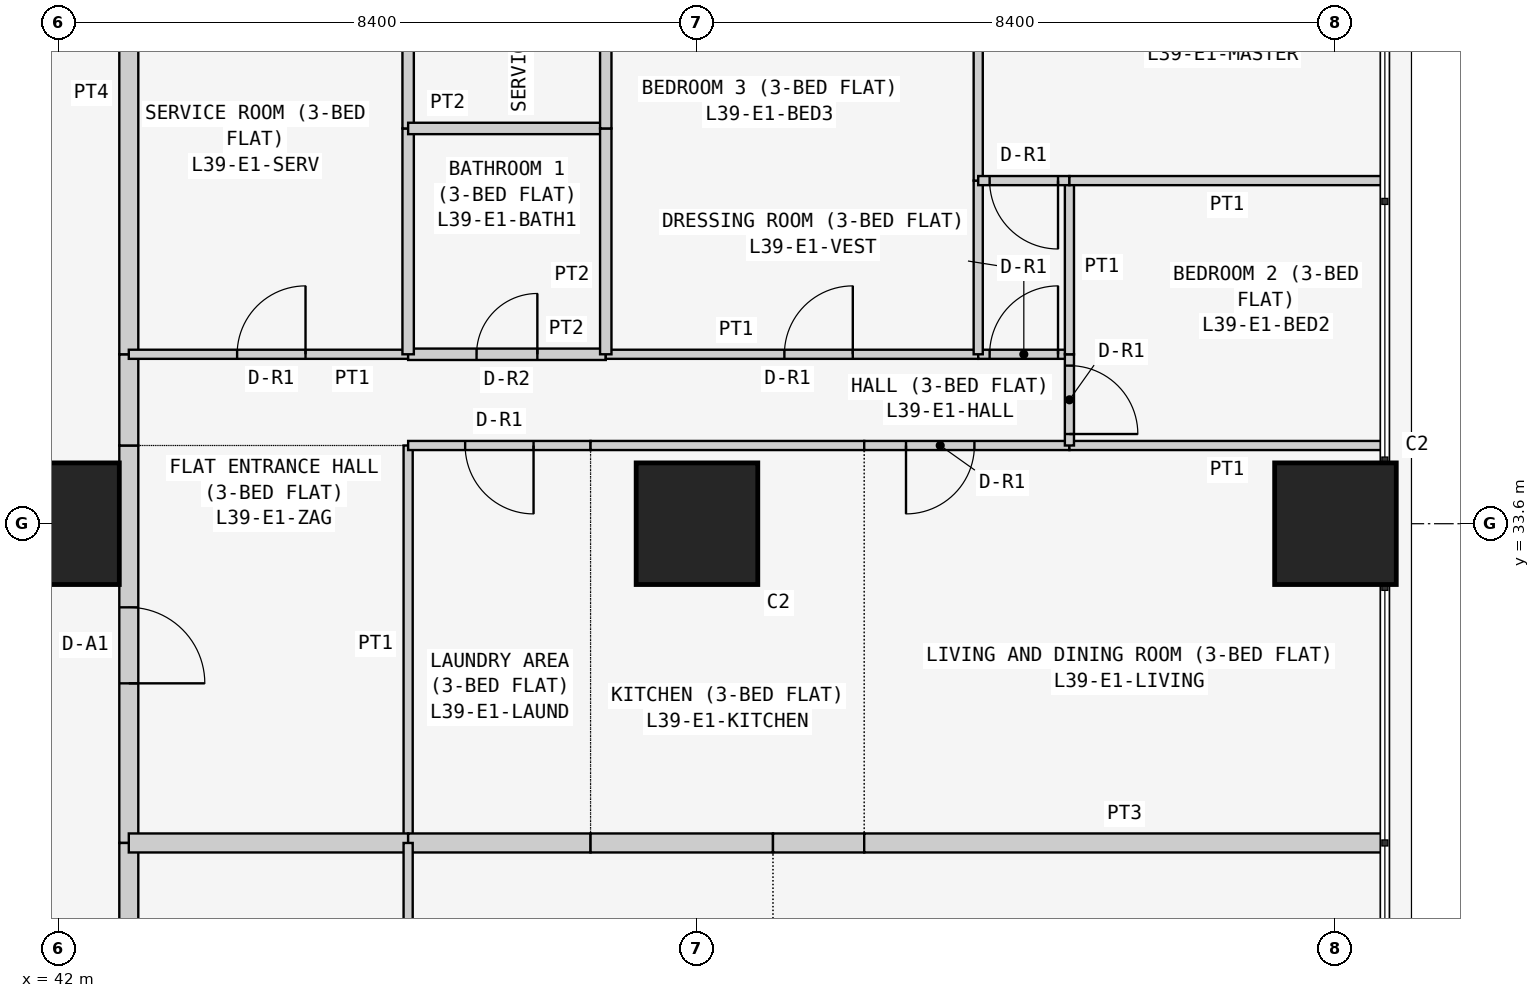
"""IFC4 building model, lengths in metres.
Left out: names, types, materials, properties, quantities, classifications, styles, units other than length and angle.
Written with IfcOpenShell. Run it as: python <this file> out.ifc"""

import sys

from ifc_helpers import new_model, si_unit, direction, frame, frame_2d, origin, origin_2d, place, context, subcontext, project, spatial, rectangle, extrude, element, fill, save


model = new_model("IFC4")
c1 = context("Model", 3, precision=1e-05, world=origin(), true_north=direction((0.0, 1.0)))
c2 = subcontext(c1, "Body", "Model", "MODEL_VIEW")
j1 = project(units=[si_unit("LENGTHUNIT", "METRE"), si_unit("PLANEANGLEUNIT", "RADIAN")], contexts=[c1])
p1 = place(None, origin())
s1 = spatial("IfcSite", under=j1, at=p1, CompositionType="ELEMENT")
p2 = place(p1, origin())
s2 = spatial("IfcBuilding", under=s1, at=p2, CompositionType="ELEMENT")
p3 = place(p2, frame((0.0, 0.0, 152.1)))
s3 = spatial("IfcBuildingStorey", under=s2, at=p3, CompositionType="ELEMENT", Elevation=152.1)
for number, where, z_axis, x_axis in (
    (1, (42.0, 33.6, 0.0), (0.0, 0.0, 1.0), (1.0, 0.0, 0.0)),
    (2, (50.4, 33.6, 0.0), (0.0, 0.0, 1.0), (1.0, 0.0, 0.0)),
    (3, (58.8, 33.6, 0.0), (0.0, 0.0, 1.0), (1.0, 0.0, 0.0)),
):
    element("IfcColumn", number, at=place(p3, frame(where, z_axis=z_axis, x_axis=x_axis)), inside=s3, PredefinedType="COLUMN", context=c2, shape_type="SweptSolid", body=[
        extrude(rectangle(XDim=1.6, YDim=1.6, at=origin_2d()), origin(), (0.0, 0.0, 1.0), 3.6),
    ])
p4 = place(p3, frame((42.925, 34.629, 0.0), z_axis=(0.0, 0.0, 1.0), x_axis=(0.0, -1.0, 0.0)))
e4 = element("IfcWall", 4, at=p4, inside=s3, PredefinedType="PARTITIONING", context=c2, shape_type="SweptSolid", body=[
    extrude(rectangle(XDim=5.229, YDim=0.25, at=frame_2d((2.615, 0.0))), origin(), (0.0, 0.0, 1.0), 3.45),
])
p5 = place(p4, frame((2.129, 0.0, 0.0)))
e5 = element("IfcOpeningElement", 5, at=p5, cuts=e4, PredefinedType="OPENING", context=c2, shape_type="SweptSolid", body=[
    extrude(rectangle(XDim=1.0, YDim=2.1, at=frame_2d((0.5, 1.05))), frame((0.0, 0.135, 0.0), z_axis=(0.0, -1.0, 0.0), x_axis=(1.0, 0.0, 0.0)), (0.0, 0.0, 1.0), 0.27),
])
p6 = place(p3, frame((42.925, 35.829, 0.0), z_axis=(0.0, 0.0, 1.0), x_axis=(0.0, -1.0, 0.0)))
e6 = element("IfcWall", 6, at=p6, inside=s3, PredefinedType="PARTITIONING", context=c2, shape_type="SweptSolid", body=[
    extrude(rectangle(XDim=1.2, YDim=0.25, at=frame_2d((0.6, 0.0))), origin(), (0.0, 0.0, 1.0), 3.45),
])
p7 = place(p3, frame((42.925, 42.7, 0.0), z_axis=(0.0, 0.0, 1.0), x_axis=(0.0, -1.0, 0.0)))
e7 = element("IfcWall", 7, at=p7, inside=s3, PredefinedType="PARTITIONING", context=c2, shape_type="SweptSolid", body=[
    extrude(rectangle(XDim=6.871, YDim=0.25, at=frame_2d((3.436, 0.0))), origin(), (0.0, 0.0, 1.0), 3.45),
])
p8 = place(p3, frame((42.925, 29.4, 0.0), z_axis=(0.0, 0.0, 1.0), x_axis=(0.0, -1.0, 0.0)))
e8 = element("IfcWall", 8, at=p8, inside=s3, PredefinedType="PARTITIONING", context=c2, shape_type="SweptSolid", body=[
    extrude(rectangle(XDim=5.229, YDim=0.25, at=frame_2d((2.615, 0.0))), origin(), (0.0, 0.0, 1.0), 3.45),
])
p9 = place(p8, frame((2.1, 0.0, 0.0)))
e9 = element("IfcOpeningElement", 9, at=p9, cuts=e8, PredefinedType="OPENING", context=c2, shape_type="SweptSolid", body=[
    extrude(rectangle(XDim=1.0, YDim=2.1, at=frame_2d((0.5, 1.05))), frame((0.0, 0.135, 0.0), z_axis=(0.0, -1.0, 0.0), x_axis=(1.0, 0.0, 0.0)), (0.0, 0.0, 1.0), 0.27),
])
p10 = place(p3, frame((46.6, 29.4, 0.0), z_axis=(0.0, 0.0, 1.0), x_axis=(0.0, 1.0, 0.0)))
e10 = element("IfcWall", 10, at=p10, inside=s3, PredefinedType="PARTITIONING", context=c2, shape_type="SweptSolid", body=[
    extrude(rectangle(XDim=5.229, YDim=0.12, at=frame_2d((2.615, 0.0))), origin(), (0.0, 0.0, 1.0), 3.45),
])
p11 = place(p3, frame((42.925, 29.4, 0.0), z_axis=(0.0, 0.0, 1.0), x_axis=(1.0, 0.0, 0.0)))
e11 = element("IfcWall", 11, at=p11, inside=s3, PredefinedType="PARTITIONING", context=c2, shape_type="SweptSolid", body=[
    extrude(rectangle(XDim=3.675, YDim=0.25, at=frame_2d((1.837, 0.0))), origin(), (0.0, 0.0, 1.0), 3.45),
])
p12 = place(p3, frame((49.0, 34.629, 0.0), z_axis=(0.0, 0.0, 1.0), x_axis=(-1.0, 0.0, 0.0)))
e12 = element("IfcWall", 12, at=p12, inside=s3, PredefinedType="PARTITIONING", context=c2, shape_type="SweptSolid", body=[
    extrude(rectangle(XDim=2.4, YDim=0.12, at=frame_2d((1.2, 0.0))), origin(), (0.0, 0.0, 1.0), 3.45),
])
p13 = place(p12, frame((0.75, 0.0, 0.0)))
e13 = element("IfcOpeningElement", 13, at=p13, cuts=e12, PredefinedType="OPENING", context=c2, shape_type="SweptSolid", body=[
    extrude(rectangle(XDim=0.9, YDim=2.1, at=frame_2d((0.45, 1.05))), frame((0.0, 0.07, 0.0), z_axis=(0.0, -1.0, 0.0), x_axis=(1.0, 0.0, 0.0)), (0.0, 0.0, 1.0), 0.14),
])
p14 = place(p3, frame((46.6, 29.4, 0.0), z_axis=(0.0, 0.0, 1.0), x_axis=(1.0, 0.0, 0.0)))
e14 = element("IfcWall", 14, at=p14, inside=s3, PredefinedType="PARTITIONING", context=c2, shape_type="SweptSolid", body=[
    extrude(rectangle(XDim=2.4, YDim=0.25, at=frame_2d((1.2, 0.0))), origin(), (0.0, 0.0, 1.0), 3.45),
])
p15 = place(p3, frame((52.6, 34.629, 0.0), z_axis=(0.0, 0.0, 1.0), x_axis=(-1.0, 0.0, 0.0)))
e15 = element("IfcWall", 15, at=p15, inside=s3, PredefinedType="PARTITIONING", context=c2, shape_type="SweptSolid", body=[
    extrude(rectangle(XDim=3.6, YDim=0.12, at=frame_2d((1.8, 0.0))), origin(), (0.0, 0.0, 1.0), 3.45),
])
p16 = place(p3, frame((49.0, 29.4, 0.0), z_axis=(0.0, 0.0, 1.0), x_axis=(1.0, 0.0, 0.0)))
e16 = element("IfcWall", 16, at=p16, inside=s3, PredefinedType="PARTITIONING", context=c2, shape_type="SweptSolid", body=[
    extrude(rectangle(XDim=2.4, YDim=0.25, at=frame_2d((1.2, 0.0))), origin(), (0.0, 0.0, 1.0), 3.45),
])
p17 = place(p3, frame((51.4, 29.4, 0.0), z_axis=(0.0, 0.0, 1.0), x_axis=(1.0, 0.0, 0.0)))
e17 = element("IfcWall", 17, at=p17, inside=s3, PredefinedType="PARTITIONING", context=c2, shape_type="SweptSolid", body=[
    extrude(rectangle(XDim=1.2, YDim=0.25, at=frame_2d((0.6, 0.0))), origin(), (0.0, 0.0, 1.0), 3.45),
])
p18 = place(p3, frame((55.3, 34.629, 0.0), z_axis=(0.0, 0.0, 1.0), x_axis=(-1.0, 0.0, 0.0)))
e18 = element("IfcWall", 18, at=p18, inside=s3, PredefinedType="PARTITIONING", context=c2, shape_type="SweptSolid", body=[
    extrude(rectangle(XDim=2.7, YDim=0.12, at=frame_2d((1.35, 0.0))), origin(), (0.0, 0.0, 1.0), 3.45),
])
p19 = place(p18, frame((1.25, 0.0, 0.0)))
e19 = element("IfcOpeningElement", 19, at=p19, cuts=e18, PredefinedType="OPENING", context=c2, shape_type="SweptSolid", body=[
    extrude(rectangle(XDim=0.9, YDim=2.1, at=frame_2d((0.45, 1.05))), frame((0.0, 0.07, 0.0), z_axis=(0.0, -1.0, 0.0), x_axis=(1.0, 0.0, 0.0)), (0.0, 0.0, 1.0), 0.14),
])
p20 = place(p3, frame((59.45, 34.629, 0.0), z_axis=(0.0, 0.0, 1.0), x_axis=(-1.0, 0.0, 0.0)))
e20 = element("IfcWall", 20, at=p20, inside=s3, PredefinedType="PARTITIONING", context=c2, shape_type="SweptSolid", body=[
    extrude(rectangle(XDim=4.15, YDim=0.12, at=frame_2d((2.075, 0.0))), origin(), (0.0, 0.0, 1.0), 3.45),
])
p21 = place(p3, frame((52.6, 29.4, 0.0), z_axis=(0.0, 0.0, 1.0), x_axis=(1.0, 0.0, 0.0)))
e21 = element("IfcWall", 21, at=p21, inside=s3, PredefinedType="PARTITIONING", context=c2, shape_type="SweptSolid", body=[
    extrude(rectangle(XDim=6.85, YDim=0.25, at=frame_2d((3.425, 0.0))), origin(), (0.0, 0.0, 1.0), 3.45),
])
p22 = place(p3, frame((46.6, 35.829, 0.0), z_axis=(0.0, 0.0, 1.0), x_axis=(-1.0, 0.0, 0.0)))
e22 = element("IfcWall", 22, at=p22, inside=s3, PredefinedType="PARTITIONING", context=c2, shape_type="SweptSolid", body=[
    extrude(rectangle(XDim=3.675, YDim=0.12, at=frame_2d((1.837, 0.0))), origin(), (0.0, 0.0, 1.0), 3.45),
])
p23 = place(p22, frame((1.35, 0.0, 0.0)))
e23 = element("IfcOpeningElement", 23, at=p23, cuts=e22, PredefinedType="OPENING", context=c2, shape_type="SweptSolid", body=[
    extrude(rectangle(XDim=0.9, YDim=2.1, at=frame_2d((0.45, 1.05))), frame((0.0, 0.07, 0.0), z_axis=(0.0, -1.0, 0.0), x_axis=(1.0, 0.0, 0.0)), (0.0, 0.0, 1.0), 0.14),
])
p24 = place(p3, frame((49.2, 35.829, 0.0), z_axis=(0.0, 0.0, 1.0), x_axis=(-1.0, 0.0, 0.0)))
e24 = element("IfcWall", 24, at=p24, inside=s3, PredefinedType="PARTITIONING", context=c2, shape_type="SweptSolid", body=[
    extrude(rectangle(XDim=2.6, YDim=0.15, at=frame_2d((1.3, 0.0))), origin(), (0.0, 0.0, 1.0), 3.45),
])
p25 = place(p24, frame((0.9, 0.0, 0.0)))
e25 = element("IfcOpeningElement", 25, at=p25, cuts=e24, PredefinedType="OPENING", context=c2, shape_type="SweptSolid", body=[
    extrude(rectangle(XDim=0.8, YDim=2.1, at=frame_2d((0.4, 1.05))), frame((0.0, 0.085, 0.0), z_axis=(0.0, -1.0, 0.0), x_axis=(1.0, 0.0, 0.0)), (0.0, 0.0, 1.0), 0.17),
])
p26 = place(p3, frame((54.1, 35.829, 0.0), z_axis=(0.0, 0.0, 1.0), x_axis=(-1.0, 0.0, 0.0)))
e26 = element("IfcWall", 26, at=p26, inside=s3, PredefinedType="PARTITIONING", context=c2, shape_type="SweptSolid", body=[
    extrude(rectangle(XDim=4.9, YDim=0.12, at=frame_2d((2.45, 0.0))), origin(), (0.0, 0.0, 1.0), 3.45),
])
p27 = place(p26, frame((1.65, 0.0, 0.0)))
e27 = element("IfcOpeningElement", 27, at=p27, cuts=e26, PredefinedType="OPENING", context=c2, shape_type="SweptSolid", body=[
    extrude(rectangle(XDim=0.9, YDim=2.1, at=frame_2d((0.45, 1.05))), frame((0.0, 0.07, 0.0), z_axis=(0.0, -1.0, 0.0), x_axis=(1.0, 0.0, 0.0)), (0.0, 0.0, 1.0), 0.14),
])
p28 = place(p3, frame((55.3, 35.829, 0.0), z_axis=(0.0, 0.0, 1.0), x_axis=(-1.0, 0.0, 0.0)))
e28 = element("IfcWall", 28, at=p28, inside=s3, PredefinedType="PARTITIONING", context=c2, shape_type="SweptSolid", body=[
    extrude(rectangle(XDim=1.2, YDim=0.12, at=frame_2d((0.6, 0.0))), origin(), (0.0, 0.0, 1.0), 3.45),
])
p29 = place(p28, frame((0.15, 0.0, 0.0)))
e29 = element("IfcOpeningElement", 29, at=p29, cuts=e28, PredefinedType="OPENING", context=c2, shape_type="SweptSolid", body=[
    extrude(rectangle(XDim=0.9, YDim=2.1, at=frame_2d((0.45, 1.05))), frame((0.0, 0.07, 0.0), z_axis=(0.0, -1.0, 0.0), x_axis=(1.0, 0.0, 0.0)), (0.0, 0.0, 1.0), 0.14),
])
p30 = place(p3, frame((55.3, 34.629, 0.0), z_axis=(0.0, 0.0, 1.0), x_axis=(0.0, 1.0, 0.0)))
e30 = element("IfcWall", 30, at=p30, inside=s3, PredefinedType="PARTITIONING", context=c2, shape_type="SweptSolid", body=[
    extrude(rectangle(XDim=1.2, YDim=0.12, at=frame_2d((0.6, 0.0))), origin(), (0.0, 0.0, 1.0), 3.45),
])
p31 = place(p30, frame((0.151, 0.0, 0.0)))
e31 = element("IfcOpeningElement", 31, at=p31, cuts=e30, PredefinedType="OPENING", context=c2, shape_type="SweptSolid", body=[
    extrude(rectangle(XDim=0.9, YDim=2.1, at=frame_2d((0.45, 1.05))), frame((0.0, 0.07, 0.0), z_axis=(0.0, -1.0, 0.0), x_axis=(1.0, 0.0, 0.0)), (0.0, 0.0, 1.0), 0.14),
])
p32 = place(p3, frame((46.6, 35.829, 0.0), z_axis=(0.0, 0.0, 1.0), x_axis=(0.0, 1.0, 0.0)))
e32 = element("IfcWall", 32, at=p32, inside=s3, PredefinedType="PARTITIONING", context=c2, shape_type="SweptSolid", body=[
    extrude(rectangle(XDim=2.971, YDim=0.15, at=frame_2d((1.485, 0.0))), origin(), (0.0, 0.0, 1.0), 3.45),
])
p33 = place(p3, frame((46.6, 38.8, 0.0), z_axis=(0.0, 0.0, 1.0), x_axis=(0.0, 1.0, 0.0)))
e33 = element("IfcWall", 33, at=p33, inside=s3, PredefinedType="PARTITIONING", context=c2, shape_type="SweptSolid", body=[
    extrude(rectangle(XDim=3.9, YDim=0.15, at=frame_2d((1.95, 0.0))), origin(), (0.0, 0.0, 1.0), 3.45),
])
p34 = place(p33, frame((1.45, 0.0, 0.0)))
e34 = element("IfcOpeningElement", 34, at=p34, cuts=e33, PredefinedType="OPENING", context=c2, shape_type="SweptSolid", body=[
    extrude(rectangle(XDim=0.8, YDim=2.1, at=frame_2d((0.4, 1.05))), frame((0.0, 0.085, 0.0), z_axis=(0.0, -1.0, 0.0), x_axis=(1.0, 0.0, 0.0)), (0.0, 0.0, 1.0), 0.17),
])
p35 = place(p3, frame((49.2, 38.8, 0.0), z_axis=(0.0, 0.0, 1.0), x_axis=(-1.0, 0.0, 0.0)))
e35 = element("IfcWall", 35, at=p35, inside=s3, PredefinedType="PARTITIONING", context=c2, shape_type="SweptSolid", body=[
    extrude(rectangle(XDim=2.6, YDim=0.15, at=frame_2d((1.3, 0.0))), origin(), (0.0, 0.0, 1.0), 3.45),
])
p36 = place(p3, frame((49.2, 35.829, 0.0), z_axis=(0.0, 0.0, 1.0), x_axis=(0.0, 1.0, 0.0)))
e36 = element("IfcWall", 36, at=p36, inside=s3, PredefinedType="PARTITIONING", context=c2, shape_type="SweptSolid", body=[
    extrude(rectangle(XDim=2.971, YDim=0.15, at=frame_2d((1.485, 0.0))), origin(), (0.0, 0.0, 1.0), 3.45),
])
p37 = place(p3, frame((49.2, 38.8, 0.0), z_axis=(0.0, 0.0, 1.0), x_axis=(0.0, 1.0, 0.0)))
e37 = element("IfcWall", 37, at=p37, inside=s3, PredefinedType="PARTITIONING", context=c2, shape_type="SweptSolid", body=[
    extrude(rectangle(XDim=3.9, YDim=0.15, at=frame_2d((1.95, 0.0))), origin(), (0.0, 0.0, 1.0), 3.45),
])
p38 = place(p3, frame((54.1, 35.829, 0.0), z_axis=(0.0, 0.0, 1.0), x_axis=(0.0, 1.0, 0.0)))
e38 = element("IfcWall", 38, at=p38, inside=s3, PredefinedType="PARTITIONING", context=c2, shape_type="SweptSolid", body=[
    extrude(rectangle(XDim=2.285, YDim=0.12, at=frame_2d((1.143, 0.0))), origin(), (0.0, 0.0, 1.0), 3.45),
])
p39 = place(p3, frame((54.1, 38.114, 0.0), z_axis=(0.0, 0.0, 1.0), x_axis=(0.0, 1.0, 0.0)))
e39 = element("IfcWall", 39, at=p39, inside=s3, PredefinedType="PARTITIONING", context=c2, shape_type="SweptSolid", body=[
    extrude(rectangle(XDim=4.586, YDim=0.12, at=frame_2d((2.293, 0.0))), origin(), (0.0, 0.0, 1.0), 3.45),
])
p40 = place(p3, frame((55.3, 35.829, 0.0), z_axis=(0.0, 0.0, 1.0), x_axis=(0.0, 1.0, 0.0)))
e40 = element("IfcWall", 40, at=p40, inside=s3, PredefinedType="PARTITIONING", context=c2, shape_type="SweptSolid", body=[
    extrude(rectangle(XDim=2.285, YDim=0.12, at=frame_2d((1.143, 0.0))), origin(), (0.0, 0.0, 1.0), 3.45),
])
p41 = place(p3, frame((55.3, 38.114, 0.0), z_axis=(0.0, 0.0, 1.0), x_axis=(-1.0, 0.0, 0.0)))
e41 = element("IfcWall", 41, at=p41, inside=s3, PredefinedType="PARTITIONING", context=c2, shape_type="SweptSolid", body=[
    extrude(rectangle(XDim=1.2, YDim=0.12, at=frame_2d((0.6, 0.0))), origin(), (0.0, 0.0, 1.0), 3.45),
])
p42 = place(p41, frame((0.15, 0.0, 0.0)))
e42 = element("IfcOpeningElement", 42, at=p42, cuts=e41, PredefinedType="OPENING", context=c2, shape_type="SweptSolid", body=[
    extrude(rectangle(XDim=0.9, YDim=2.1, at=frame_2d((0.45, 1.05))), frame((0.0, 0.07, 0.0), z_axis=(0.0, -1.0, 0.0), x_axis=(1.0, 0.0, 0.0)), (0.0, 0.0, 1.0), 0.14),
])
p43 = place(p3, frame((59.45, 38.114, 0.0), z_axis=(0.0, 0.0, 1.0), x_axis=(-1.0, 0.0, 0.0)))
e43 = element("IfcWall", 43, at=p43, inside=s3, PredefinedType="PARTITIONING", context=c2, shape_type="SweptSolid", body=[
    extrude(rectangle(XDim=4.15, YDim=0.12, at=frame_2d((2.075, 0.0))), origin(), (0.0, 0.0, 1.0), 3.45),
])
p44 = place(p3, frame((46.6, 29.4, 0.0), z_axis=(0.0, 0.0, 1.0), x_axis=(0.0, -1.0, 0.0)))
e44 = element("IfcWall", 44, at=p44, inside=s3, PredefinedType="PARTITIONING", context=c2, shape_type="SweptSolid", body=[
    extrude(rectangle(XDim=5.229, YDim=0.12, at=frame_2d((2.615, 0.0))), origin(), (0.0, 0.0, 1.0), 3.45),
])
p45 = place(p44, frame((1.05, 0.0, 0.0)))
e45 = element("IfcOpeningElement", 45, at=p45, cuts=e44, PredefinedType="OPENING", context=c2, shape_type="SweptSolid", body=[
    extrude(rectangle(XDim=0.9, YDim=2.1, at=frame_2d((0.45, 1.05))), frame((0.0, 0.07, 0.0), z_axis=(0.0, -1.0, 0.0), x_axis=(1.0, 0.0, 0.0)), (0.0, 0.0, 1.0), 0.14),
])
p46 = place(p5, origin())
e46 = element("IfcDoor", 46, at=p46, inside=s3, OperationType="SINGLE_SWING_RIGHT", PredefinedType="DOOR", context=c2, shape_type="SweptSolid", body=[
    extrude(rectangle(XDim=1.0, YDim=2.1, at=frame_2d((0.5, 1.05))), frame((0.0, 0.025, 0.0), z_axis=(0.0, -1.0, 0.0), x_axis=(1.0, 0.0, 0.0)), (0.0, 0.0, 1.0), 0.05),
])
fill(e5, e46)
p47 = place(p13, origin())
e47 = element("IfcDoor", 47, at=p47, inside=s3, OperationType="SINGLE_SWING_LEFT", PredefinedType="DOOR", context=c2, shape_type="SweptSolid", body=[
    extrude(rectangle(XDim=0.9, YDim=2.1, at=frame_2d((0.45, 1.05))), frame((0.0, 0.025, 0.0), z_axis=(0.0, -1.0, 0.0), x_axis=(1.0, 0.0, 0.0)), (0.0, 0.0, 1.0), 0.05),
])
fill(e13, e47)
p48 = place(p19, origin())
e48 = element("IfcDoor", 48, at=p48, inside=s3, OperationType="SINGLE_SWING_RIGHT", PredefinedType="DOOR", context=c2, shape_type="SweptSolid", body=[
    extrude(rectangle(XDim=0.9, YDim=2.1, at=frame_2d((0.45, 1.05))), frame((0.0, 0.025, 0.0), z_axis=(0.0, -1.0, 0.0), x_axis=(1.0, 0.0, 0.0)), (0.0, 0.0, 1.0), 0.05),
])
fill(e19, e48)
p49 = place(p23, frame((0.9, 0.0, 0.0), z_axis=(0.0, 0.0, 1.0), x_axis=(-1.0, 0.0, 0.0)))
e49 = element("IfcDoor", 49, at=p49, inside=s3, OperationType="SINGLE_SWING_RIGHT", PredefinedType="DOOR", context=c2, shape_type="SweptSolid", body=[
    extrude(rectangle(XDim=0.9, YDim=2.1, at=frame_2d((0.45, 1.05))), frame((0.0, 0.025, 0.0), z_axis=(0.0, -1.0, 0.0), x_axis=(1.0, 0.0, 0.0)), (0.0, 0.0, 1.0), 0.05),
])
fill(e23, e49)
p50 = place(p25, frame((0.8, 0.0, 0.0), z_axis=(0.0, 0.0, 1.0), x_axis=(-1.0, 0.0, 0.0)))
e50 = element("IfcDoor", 50, at=p50, inside=s3, OperationType="SINGLE_SWING_RIGHT", PredefinedType="DOOR", context=c2, shape_type="SweptSolid", body=[
    extrude(rectangle(XDim=0.8, YDim=2.1, at=frame_2d((0.4, 1.05))), frame((0.0, 0.025, 0.0), z_axis=(0.0, -1.0, 0.0), x_axis=(1.0, 0.0, 0.0)), (0.0, 0.0, 1.0), 0.05),
])
fill(e25, e50)
p51 = place(p27, frame((0.9, 0.0, 0.0), z_axis=(0.0, 0.0, 1.0), x_axis=(-1.0, 0.0, 0.0)))
e51 = element("IfcDoor", 51, at=p51, inside=s3, OperationType="SINGLE_SWING_RIGHT", PredefinedType="DOOR", context=c2, shape_type="SweptSolid", body=[
    extrude(rectangle(XDim=0.9, YDim=2.1, at=frame_2d((0.45, 1.05))), frame((0.0, 0.025, 0.0), z_axis=(0.0, -1.0, 0.0), x_axis=(1.0, 0.0, 0.0)), (0.0, 0.0, 1.0), 0.05),
])
fill(e27, e51)
p52 = place(p29, frame((0.9, 0.0, 0.0), z_axis=(0.0, 0.0, 1.0), x_axis=(-1.0, 0.0, 0.0)))
e52 = element("IfcDoor", 52, at=p52, inside=s3, OperationType="SINGLE_SWING_RIGHT", PredefinedType="DOOR", context=c2, shape_type="SweptSolid", body=[
    extrude(rectangle(XDim=0.9, YDim=2.1, at=frame_2d((0.45, 1.05))), frame((0.0, 0.025, 0.0), z_axis=(0.0, -1.0, 0.0), x_axis=(1.0, 0.0, 0.0)), (0.0, 0.0, 1.0), 0.05),
])
fill(e29, e52)
p53 = place(p42, origin())
e53 = element("IfcDoor", 53, at=p53, inside=s3, OperationType="SINGLE_SWING_LEFT", PredefinedType="DOOR", context=c2, shape_type="SweptSolid", body=[
    extrude(rectangle(XDim=0.9, YDim=2.1, at=frame_2d((0.45, 1.05))), frame((0.0, 0.025, 0.0), z_axis=(0.0, -1.0, 0.0), x_axis=(1.0, 0.0, 0.0)), (0.0, 0.0, 1.0), 0.05),
])
fill(e42, e53)
p54 = place(p31, frame((0.9, 0.0, 0.0), z_axis=(0.0, 0.0, 1.0), x_axis=(-1.0, 0.0, 0.0)))
e54 = element("IfcDoor", 54, at=p54, inside=s3, OperationType="SINGLE_SWING_RIGHT", PredefinedType="DOOR", context=c2, shape_type="SweptSolid", body=[
    extrude(rectangle(XDim=0.9, YDim=2.1, at=frame_2d((0.45, 1.05))), frame((0.0, 0.025, 0.0), z_axis=(0.0, -1.0, 0.0), x_axis=(1.0, 0.0, 0.0)), (0.0, 0.0, 1.0), 0.05),
])
fill(e31, e54)
save(model, sys.argv[1])
